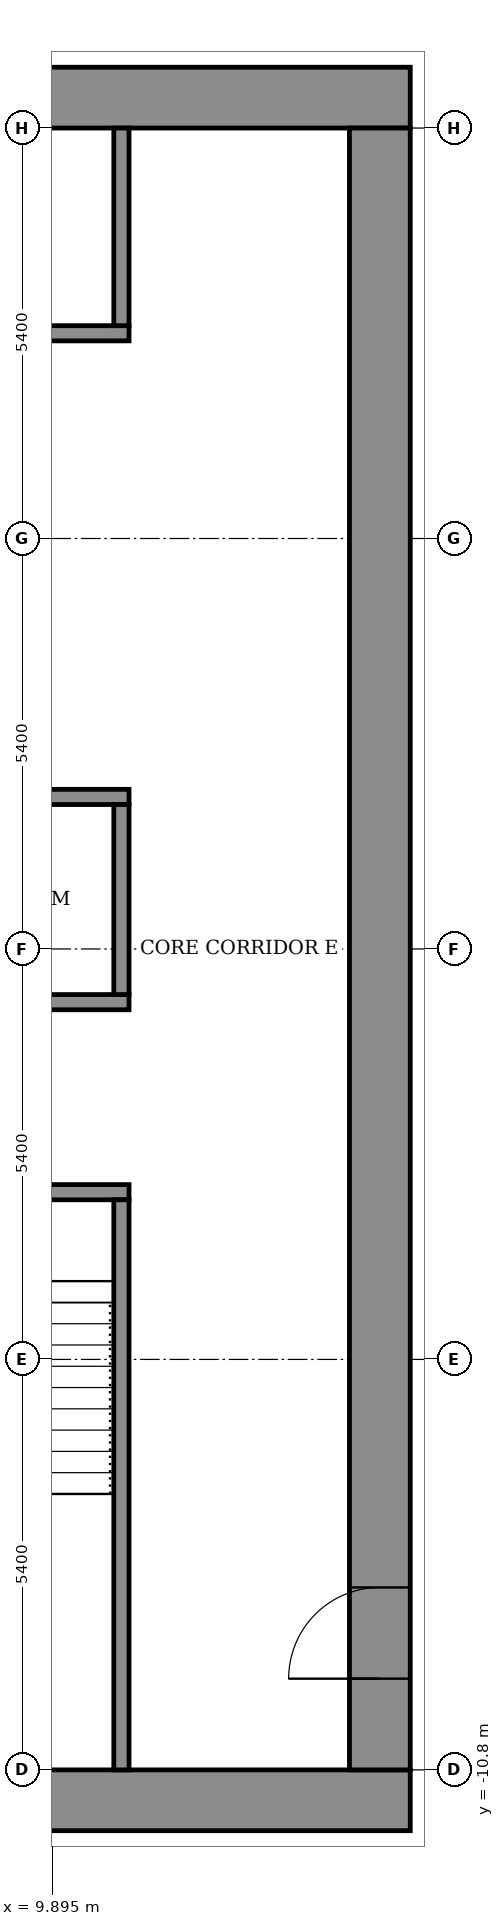
"""IFC4 building model, lengths in metres.
Left out: names, types, materials, properties, quantities, classifications, styles, units other than length and angle.
Written with IfcOpenShell. Run it as: python <this file> out.ifc"""

import sys

from ifc_helpers import new_model, si_unit, direction, frame, frame_2d, origin, place, context, subcontext, project, spatial, rectangle, extrude, element, fill, save


model = new_model("IFC4")
c1 = context("Model", 3, precision=1e-05, world=origin(), true_north=direction((0.0, 1.0)))
c2 = subcontext(c1, "Body", "Model", "MODEL_VIEW")
j1 = project(units=[si_unit("LENGTHUNIT", "METRE"), si_unit("PLANEANGLEUNIT", "RADIAN")], contexts=[c1])
p1 = place(None, origin())
s1 = spatial("IfcSite", under=j1, at=p1, CompositionType="ELEMENT")
p2 = place(p1, origin())
s2 = spatial("IfcBuilding", under=s1, at=p2, CompositionType="ELEMENT")
p3 = place(p2, frame((0.0, 0.0, 249.1)))
s3 = spatial("IfcBuildingStorey", under=s2, at=p3, CompositionType="ELEMENT", Elevation=249.1)
for number, where, z_axis, x_axis in (
    (1, (-14.6, -11.2, 0.0), (0.0, 0.0, 1.0), (1.0, 0.0, 0.0)),
    (2, (-14.6, 11.2, 0.0), (0.0, 0.0, 1.0), (1.0, 0.0, 0.0)),
):
    element("IfcWall", number, at=place(p3, frame(where, z_axis=z_axis, x_axis=x_axis)), inside=s3, PredefinedType="SHEAR", context=c2, shape_type="SweptSolid", body=[
        extrude(rectangle(XDim=29.2, YDim=0.8, at=frame_2d((14.6, 0.0))), origin(), (0.0, 0.0, 1.0), 3.6),
    ])
p4 = place(p3, frame((14.2, -10.8, 0.0), z_axis=(0.0, 0.0, 1.0), x_axis=(0.0, 1.0, 0.0)))
e3 = element("IfcWall", 3, at=p4, inside=s3, PredefinedType="SHEAR", context=c2, shape_type="SweptSolid", body=[
    extrude(rectangle(XDim=21.6, YDim=0.8, at=frame_2d((10.8, 0.0))), origin(), (0.0, 0.0, 1.0), 3.6),
])
p5 = place(p4, frame((1.2, 0.0, 0.0)))
e4 = element("IfcOpeningElement", 4, at=p5, cuts=e3, PredefinedType="OPENING", context=c2, shape_type="SweptSolid", body=[
    extrude(rectangle(XDim=1.2, YDim=2.1, at=frame_2d((0.6, 1.05))), frame((0.0, 0.41, 0.0), z_axis=(0.0, -1.0, 0.0), x_axis=(1.0, 0.0, 0.0)), (0.0, 0.0, 1.0), 0.82),
])
p6 = place(p3, frame((-10.9, -3.2, 0.0), z_axis=(0.0, 0.0, 1.0), x_axis=(1.0, 0.0, 0.0)))
e5 = element("IfcWall", 5, at=p6, inside=s3, PredefinedType="SHEAR", context=c2, shape_type="SweptSolid", body=[
    extrude(rectangle(XDim=21.8, YDim=0.2, at=frame_2d((10.9, 0.0))), origin(), (0.0, 0.0, 1.0), 3.05),
])
p7 = place(p6, frame((1.075, 0.0, 0.0)))
e6 = element("IfcOpeningElement", 6, at=p7, cuts=e5, PredefinedType="OPENING", context=c2, shape_type="SweptSolid", body=[
    extrude(rectangle(XDim=1.1, YDim=2.1, at=frame_2d((0.55, 1.05))), frame((0.0, 0.11, 0.0), z_axis=(0.0, -1.0, 0.0), x_axis=(1.0, 0.0, 0.0)), (0.0, 0.0, 1.0), 0.22),
])
p8 = place(p6, frame((10.325, 0.0, 0.0)))
e7 = element("IfcOpeningElement", 7, at=p8, cuts=e5, PredefinedType="OPENING", context=c2, shape_type="SweptSolid", body=[
    extrude(rectangle(XDim=1.1, YDim=2.1, at=frame_2d((0.55, 1.05))), frame((0.0, 0.11, 0.0), z_axis=(0.0, -1.0, 0.0), x_axis=(1.0, 0.0, 0.0)), (0.0, 0.0, 1.0), 0.22),
])
p9 = place(p6, frame((19.625, 0.0, 0.0)))
e8 = element("IfcOpeningElement", 8, at=p9, cuts=e5, PredefinedType="OPENING", context=c2, shape_type="SweptSolid", body=[
    extrude(rectangle(XDim=1.1, YDim=2.1, at=frame_2d((0.55, 1.05))), frame((0.0, 0.11, 0.0), z_axis=(0.0, -1.0, 0.0), x_axis=(1.0, 0.0, 0.0)), (0.0, 0.0, 1.0), 0.22),
])
p10 = place(p6, frame((5.7, 0.0, 0.0)))
e9 = element("IfcOpeningElement", 9, at=p10, cuts=e5, PredefinedType="OPENING", context=c2, shape_type="SweptSolid", body=[
    extrude(rectangle(XDim=1.1, YDim=2.1, at=frame_2d((0.55, 1.05))), frame((0.0, 0.11, 0.0), z_axis=(0.0, -1.0, 0.0), x_axis=(1.0, 0.0, 0.0)), (0.0, 0.0, 1.0), 0.22),
])
p11 = place(p6, frame((14.975, 0.0, 0.0)))
e10 = element("IfcOpeningElement", 10, at=p11, cuts=e5, PredefinedType="OPENING", context=c2, shape_type="SweptSolid", body=[
    extrude(rectangle(XDim=1.1, YDim=2.1, at=frame_2d((0.55, 1.05))), frame((0.0, 0.11, 0.0), z_axis=(0.0, -1.0, 0.0), x_axis=(1.0, 0.0, 0.0)), (0.0, 0.0, 1.0), 0.22),
])
p12 = place(p3, frame((-10.9, -0.7, 0.0), z_axis=(0.0, 0.0, 1.0), x_axis=(1.0, 0.0, 0.0)))
e11 = element("IfcWall", 11, at=p12, inside=s3, PredefinedType="SHEAR", context=c2, shape_type="SweptSolid", body=[
    extrude(rectangle(XDim=21.8, YDim=0.2, at=frame_2d((10.9, 0.0))), origin(), (0.0, 0.0, 1.0), 3.05),
])
p13 = place(p3, frame((-10.9, 2.0, 0.0), z_axis=(0.0, 0.0, 1.0), x_axis=(1.0, 0.0, 0.0)))
e12 = element("IfcWall", 12, at=p13, inside=s3, PredefinedType="SHEAR", context=c2, shape_type="SweptSolid", body=[
    extrude(rectangle(XDim=21.8, YDim=0.2, at=frame_2d((10.9, 0.0))), origin(), (0.0, 0.0, 1.0), 3.05),
])
p14 = place(p13, frame((4.95, 0.0, 0.0)))
e13 = element("IfcOpeningElement", 13, at=p14, cuts=e12, PredefinedType="OPENING", context=c2, shape_type="SweptSolid", body=[
    extrude(rectangle(XDim=1.1, YDim=2.1, at=frame_2d((0.55, 1.05))), frame((0.0, 0.11, 0.0), z_axis=(0.0, -1.0, 0.0), x_axis=(1.0, 0.0, 0.0)), (0.0, 0.0, 1.0), 0.22),
])
p15 = place(p13, frame((7.65, 0.0, 0.0)))
e14 = element("IfcOpeningElement", 14, at=p15, cuts=e12, PredefinedType="OPENING", context=c2, shape_type="SweptSolid", body=[
    extrude(rectangle(XDim=1.1, YDim=2.1, at=frame_2d((0.55, 1.05))), frame((0.0, 0.11, 0.0), z_axis=(0.0, -1.0, 0.0), x_axis=(1.0, 0.0, 0.0)), (0.0, 0.0, 1.0), 0.22),
])
p16 = place(p13, frame((10.35, 0.0, 0.0)))
e15 = element("IfcOpeningElement", 15, at=p16, cuts=e12, PredefinedType="OPENING", context=c2, shape_type="SweptSolid", body=[
    extrude(rectangle(XDim=1.1, YDim=2.1, at=frame_2d((0.55, 1.05))), frame((0.0, 0.11, 0.0), z_axis=(0.0, -1.0, 0.0), x_axis=(1.0, 0.0, 0.0)), (0.0, 0.0, 1.0), 0.22),
])
p17 = place(p13, frame((1.675, 0.0, 0.0)))
e16 = element("IfcOpeningElement", 16, at=p17, cuts=e12, PredefinedType="OPENING", context=c2, shape_type="SweptSolid", body=[
    extrude(rectangle(XDim=0.9, YDim=2.1, at=frame_2d((0.45, 1.05))), frame((0.0, 0.11, 0.0), z_axis=(0.0, -1.0, 0.0), x_axis=(1.0, 0.0, 0.0)), (0.0, 0.0, 1.0), 0.22),
])
p18 = place(p13, frame((14.5, 0.0, 0.0)))
e17 = element("IfcOpeningElement", 17, at=p18, cuts=e12, PredefinedType="OPENING", context=c2, shape_type="SweptSolid", body=[
    extrude(rectangle(XDim=0.9, YDim=2.1, at=frame_2d((0.45, 1.05))), frame((0.0, 0.11, 0.0), z_axis=(0.0, -1.0, 0.0), x_axis=(1.0, 0.0, 0.0)), (0.0, 0.0, 1.0), 0.22),
])
p19 = place(p13, frame((19.225, 0.0, 0.0)))
e18 = element("IfcOpeningElement", 18, at=p19, cuts=e12, PredefinedType="OPENING", context=c2, shape_type="SweptSolid", body=[
    extrude(rectangle(XDim=0.9, YDim=2.1, at=frame_2d((0.45, 1.05))), frame((0.0, 0.11, 0.0), z_axis=(0.0, -1.0, 0.0), x_axis=(1.0, 0.0, 0.0)), (0.0, 0.0, 1.0), 0.22),
])
p20 = place(p3, frame((-10.9, 8.1, 0.0), z_axis=(0.0, 0.0, 1.0), x_axis=(1.0, 0.0, 0.0)))
e19 = element("IfcWall", 19, at=p20, inside=s3, PredefinedType="SHEAR", context=c2, shape_type="SweptSolid", body=[
    extrude(rectangle(XDim=21.8, YDim=0.2, at=frame_2d((10.9, 0.0))), origin(), (0.0, 0.0, 1.0), 3.05),
])
p21 = place(p20, frame((4.95, 0.0, 0.0)))
e20 = element("IfcOpeningElement", 20, at=p21, cuts=e19, PredefinedType="OPENING", context=c2, shape_type="SweptSolid", body=[
    extrude(rectangle(XDim=1.1, YDim=2.1, at=frame_2d((0.55, 1.05))), frame((0.0, 0.11, 0.0), z_axis=(0.0, -1.0, 0.0), x_axis=(1.0, 0.0, 0.0)), (0.0, 0.0, 1.0), 0.22),
])
p22 = place(p20, frame((7.65, 0.0, 0.0)))
e21 = element("IfcOpeningElement", 21, at=p22, cuts=e19, PredefinedType="OPENING", context=c2, shape_type="SweptSolid", body=[
    extrude(rectangle(XDim=1.1, YDim=2.1, at=frame_2d((0.55, 1.05))), frame((0.0, 0.11, 0.0), z_axis=(0.0, -1.0, 0.0), x_axis=(1.0, 0.0, 0.0)), (0.0, 0.0, 1.0), 0.22),
])
p23 = place(p20, frame((10.35, 0.0, 0.0)))
e22 = element("IfcOpeningElement", 22, at=p23, cuts=e19, PredefinedType="OPENING", context=c2, shape_type="SweptSolid", body=[
    extrude(rectangle(XDim=1.1, YDim=2.1, at=frame_2d((0.55, 1.05))), frame((0.0, 0.11, 0.0), z_axis=(0.0, -1.0, 0.0), x_axis=(1.0, 0.0, 0.0)), (0.0, 0.0, 1.0), 0.22),
])
p24 = place(p20, frame((1.675, 0.0, 0.0)))
e23 = element("IfcOpeningElement", 23, at=p24, cuts=e19, PredefinedType="OPENING", context=c2, shape_type="SweptSolid", body=[
    extrude(rectangle(XDim=0.9, YDim=2.1, at=frame_2d((0.45, 1.05))), frame((0.0, 0.11, 0.0), z_axis=(0.0, -1.0, 0.0), x_axis=(1.0, 0.0, 0.0)), (0.0, 0.0, 1.0), 0.22),
])
p25 = place(p20, frame((14.5, 0.0, 0.0)))
e24 = element("IfcOpeningElement", 24, at=p25, cuts=e19, PredefinedType="OPENING", context=c2, shape_type="SweptSolid", body=[
    extrude(rectangle(XDim=0.9, YDim=2.1, at=frame_2d((0.45, 1.05))), frame((0.0, 0.11, 0.0), z_axis=(0.0, -1.0, 0.0), x_axis=(1.0, 0.0, 0.0)), (0.0, 0.0, 1.0), 0.22),
])
p26 = place(p20, frame((19.225, 0.0, 0.0)))
e25 = element("IfcOpeningElement", 25, at=p26, cuts=e19, PredefinedType="OPENING", context=c2, shape_type="SweptSolid", body=[
    extrude(rectangle(XDim=0.9, YDim=2.1, at=frame_2d((0.45, 1.05))), frame((0.0, 0.11, 0.0), z_axis=(0.0, -1.0, 0.0), x_axis=(1.0, 0.0, 0.0)), (0.0, 0.0, 1.0), 0.22),
])
p27 = place(p3, frame((10.8, -10.8, 0.0), z_axis=(0.0, 0.0, 1.0), x_axis=(0.0, 1.0, 0.0)))
e26 = element("IfcWall", 26, at=p27, inside=s3, PredefinedType="SHEAR", context=c2, shape_type="SweptSolid", body=[
    extrude(rectangle(XDim=7.5, YDim=0.2, at=frame_2d((3.75, 0.0))), origin(), (0.0, 0.0, 1.0), 3.05),
])
p28 = place(p3, frame((10.8, -0.6, 0.0), z_axis=(0.0, 0.0, 1.0), x_axis=(0.0, 1.0, 0.0)))
e27 = element("IfcWall", 27, at=p28, inside=s3, PredefinedType="STANDARD", context=c2, shape_type="SweptSolid", body=[
    extrude(rectangle(XDim=2.5, YDim=0.2, at=frame_2d((1.25, 0.0))), origin(), (0.0, 0.0, 1.0), 3.05),
])
p29 = place(p3, frame((10.8, 8.2, 0.0), z_axis=(0.0, 0.0, 1.0), x_axis=(0.0, 1.0, 0.0)))
e28 = element("IfcWall", 28, at=p29, inside=s3, PredefinedType="STANDARD", context=c2, shape_type="SweptSolid", body=[
    extrude(rectangle(XDim=2.6, YDim=0.2, at=frame_2d((1.3, 0.0))), origin(), (0.0, 0.0, 1.0), 3.05),
])
p30 = place(p5, origin())
e29 = element("IfcDoor", 29, at=p30, inside=s3, OperationType="DOUBLE_DOOR_SINGLE_SWING", PredefinedType="DOOR", context=c2, shape_type="SweptSolid", body=[
    extrude(rectangle(XDim=1.2, YDim=2.1, at=frame_2d((0.6, 1.05))), frame((0.0, 0.025, 0.0), z_axis=(0.0, -1.0, 0.0), x_axis=(1.0, 0.0, 0.0)), (0.0, 0.0, 1.0), 0.05),
])
fill(e4, e29)
save(model, sys.argv[1])
